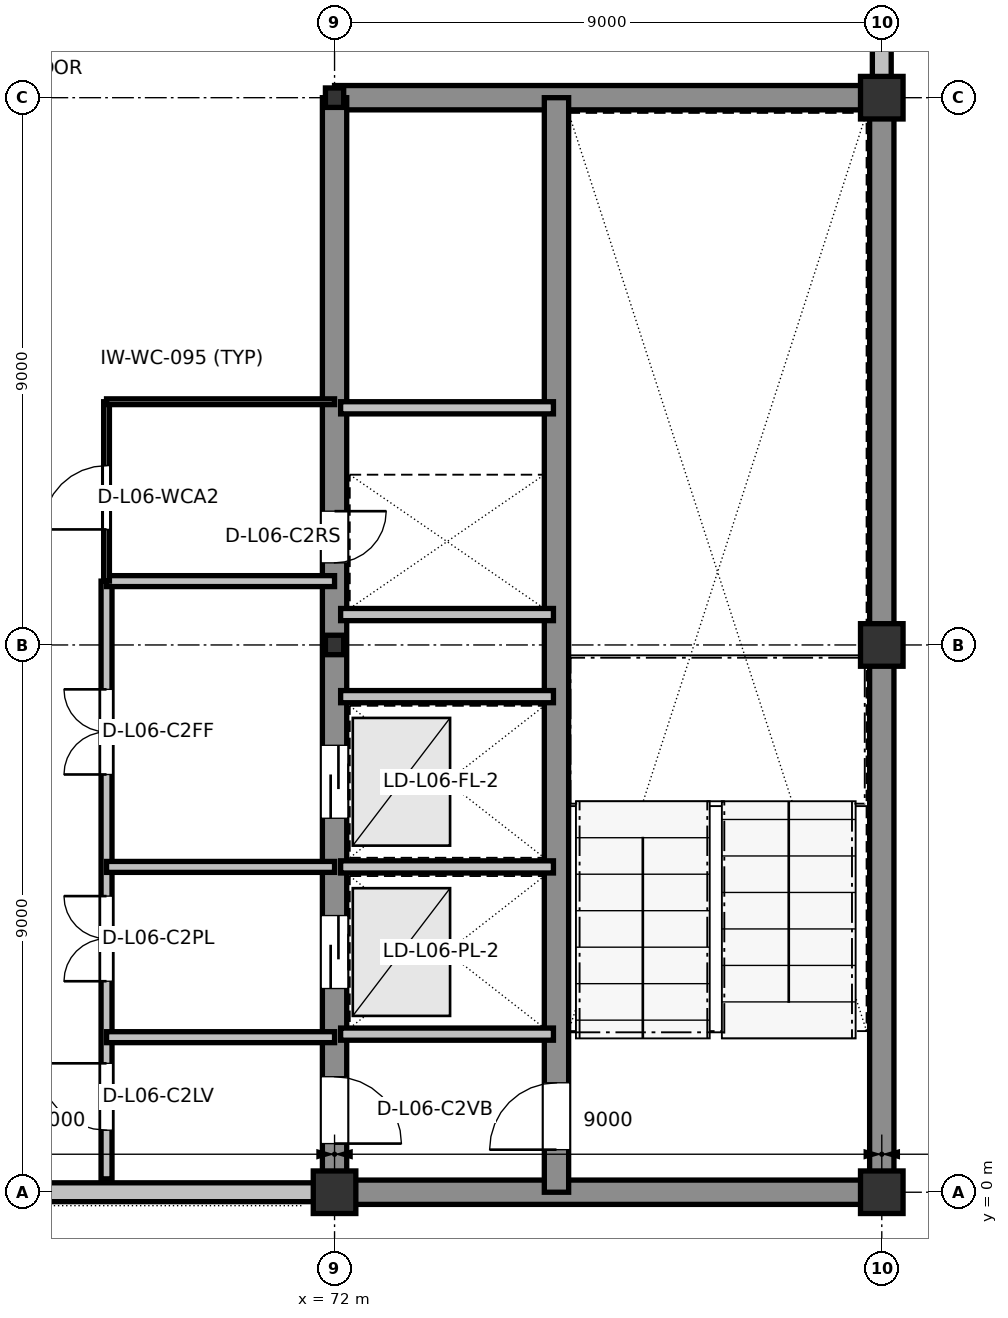
"""IFC4 building model, lengths in metres.
Left out: names, types, materials, properties, quantities, classifications, styles, units other than length and angle.
Written with IfcOpenShell. Run it as: python <this file> out.ifc"""

import sys

from ifc_helpers import new_model, si_unit, direction, frame, frame_2d, origin, origin_2d, place, context, subcontext, project, spatial, rectangle, i_section, extrude, element, fill, save


model = new_model("IFC4")
c1 = context("Model", 3, precision=1e-05, world=origin(), true_north=direction((0.0, 1.0)))
c2 = subcontext(c1, "Body", "Model", "MODEL_VIEW")
j1 = project(units=[si_unit("LENGTHUNIT", "METRE"), si_unit("PLANEANGLEUNIT", "RADIAN")], contexts=[c1])
p1 = place(None, origin())
s1 = spatial("IfcSite", under=j1, at=p1, CompositionType="ELEMENT")
p2 = place(p1, origin())
s2 = spatial("IfcBuilding", under=s1, at=p2, CompositionType="ELEMENT")
p3 = place(p2, frame((0.0, 0.0, 27.6)))
s3 = spatial("IfcBuildingStorey", under=s2, at=p3, CompositionType="ELEMENT", Elevation=27.6)
p4 = place(p3, frame((72.0, 0.0, 0.0), z_axis=(0.0, 0.0, 1.0), x_axis=(1.0, 0.0, 0.0)))
e1 = element("IfcColumn", 1, at=p4, inside=s3, PredefinedType="COLUMN", context=c2, shape_type="SweptSolid", body=[
    extrude(rectangle(XDim=0.7, YDim=0.7, at=origin_2d()), origin(), (0.0, 0.0, 1.0), 4.2),
])
for number, where, z_axis, x_axis in (
    (2, (72.0, 9.0, 0.0), (0.0, 0.0, 1.0), (1.0, 0.0, 0.0)),
    (3, (72.0, 18.0, 0.0), (0.0, 0.0, 1.0), (1.0, 0.0, 0.0)),
):
    element("IfcColumn", number, at=place(p3, frame(where, z_axis=z_axis, x_axis=x_axis)), inside=s3, PredefinedType="COLUMN", context=c2, shape_type="SweptSolid", body=[
        extrude(i_section(OverallWidth=0.3, OverallDepth=0.32, WebThickness=0.011, FlangeThickness=0.021, at=origin_2d()), origin(), (0.0, 0.0, 1.0), 4.2),
    ])
for number, where, z_axis, x_axis in (
    (4, (81.0, 0.0, 0.0), (0.0, 0.0, 1.0), (1.0, 0.0, 0.0)),
    (5, (81.0, 9.0, 0.0), (0.0, 0.0, 1.0), (1.0, 0.0, 0.0)),
    (6, (81.0, 18.0, 0.0), (0.0, 0.0, 1.0), (1.0, 0.0, 0.0)),
):
    element("IfcColumn", number, at=place(p3, frame(where, z_axis=z_axis, x_axis=x_axis)), inside=s3, PredefinedType="COLUMN", context=c2, shape_type="SweptSolid", body=[
        extrude(rectangle(XDim=0.7, YDim=0.7, at=origin_2d()), origin(), (0.0, 0.0, 1.0), 4.2),
    ])
p5 = place(p3, frame((63.335, 0.0, 0.0), z_axis=(0.0, 0.0, 1.0), x_axis=(1.0, 0.0, 0.0)))
e7 = element("IfcWall", 7, at=p5, inside=s3, PredefinedType="STANDARD", context=c2, shape_type="SweptSolid", body=[
    extrude(rectangle(XDim=8.33, YDim=0.31, at=frame_2d((4.165, 0.0))), origin(), (0.0, 0.0, 1.0), 3.715),
])
p6 = place(p5, frame((0.75, 0.0, 0.9)))
e8 = element("IfcOpeningElement", 8, at=p6, cuts=e7, PredefinedType="OPENING", context=c2, shape_type="SweptSolid", body=[
    extrude(rectangle(XDim=1.0, YDim=1.35, at=frame_2d((0.5, 0.675))), frame((0.0, 0.165, 0.0), z_axis=(0.0, -1.0, 0.0), x_axis=(1.0, 0.0, 0.0)), (0.0, 0.0, 1.0), 0.33),
])
p7 = place(p3, frame((81.0, 18.335, 0.0), z_axis=(0.0, 0.0, 1.0), x_axis=(0.0, 1.0, 0.0)))
e9 = element("IfcWall", 9, at=p7, inside=s3, PredefinedType="STANDARD", context=c2, shape_type="SweptSolid", body=[
    extrude(rectangle(XDim=2.74, YDim=0.31, at=frame_2d((1.37, 0.0))), origin(), (0.0, 0.0, 1.0), 3.94),
])
p8 = place(p3, frame((72.0, 0.0, 0.0), z_axis=(0.0, 0.0, 1.0), x_axis=(1.0, 0.0, 0.0)))
e10 = element("IfcWall", 10, at=p8, inside=s3, PredefinedType="SHEAR", context=c2, shape_type="SweptSolid", body=[
    extrude(rectangle(XDim=9.0, YDim=0.4, at=frame_2d((4.5, 0.0))), origin(), (0.0, 0.0, 1.0), 3.96),
])
p9 = place(p3, frame((81.0, 0.0, 0.0), z_axis=(0.0, 0.0, 1.0), x_axis=(0.0, 1.0, 0.0)))
e11 = element("IfcWall", 11, at=p9, inside=s3, PredefinedType="SHEAR", context=c2, shape_type="SweptSolid", body=[
    extrude(rectangle(XDim=18.0, YDim=0.4, at=frame_2d((9.0, 0.0))), origin(), (0.0, 0.0, 1.0), 3.96),
])
p10 = place(p3, frame((81.0, 18.0, 0.0), z_axis=(0.0, 0.0, 1.0), x_axis=(-1.0, 0.0, 0.0)))
e12 = element("IfcWall", 12, at=p10, inside=s3, PredefinedType="SHEAR", context=c2, shape_type="SweptSolid", body=[
    extrude(rectangle(XDim=9.0, YDim=0.4, at=frame_2d((4.5, 0.0))), origin(), (0.0, 0.0, 1.0), 3.96),
])
p11 = place(p3, frame((72.0, 18.0, 0.0), z_axis=(0.0, 0.0, 1.0), x_axis=(0.0, -1.0, 0.0)))
e13 = element("IfcWall", 13, at=p11, inside=s3, PredefinedType="SHEAR", context=c2, shape_type="SweptSolid", body=[
    extrude(rectangle(XDim=18.0, YDim=0.4, at=frame_2d((9.0, 0.0))), origin(), (0.0, 0.0, 1.0), 3.96),
])
p12 = place(p11, frame((16.1, 0.0, 0.0)))
e14 = element("IfcOpeningElement", 14, at=p12, cuts=e13, PredefinedType="OPENING", context=c2, shape_type="SweptSolid", body=[
    extrude(rectangle(XDim=1.1, YDim=2.16, at=frame_2d((0.55, 1.08))), frame((0.0, 0.21, 0.0), z_axis=(0.0, -1.0, 0.0), x_axis=(1.0, 0.0, 0.0)), (0.0, 0.0, 1.0), 0.42),
])
p13 = place(p11, frame((13.45, 0.0, 0.0)))
e15 = element("IfcOpeningElement", 15, at=p13, cuts=e13, PredefinedType="OPENING", context=c2, shape_type="SweptSolid", body=[
    extrude(rectangle(XDim=1.2, YDim=2.2, at=frame_2d((0.6, 1.1))), frame((0.0, 0.21, 0.0), z_axis=(0.0, -1.0, 0.0), x_axis=(1.0, 0.0, 0.0)), (0.0, 0.0, 1.0), 0.42),
])
p14 = place(p11, frame((10.65, 0.0, 0.0)))
e16 = element("IfcOpeningElement", 16, at=p14, cuts=e13, PredefinedType="OPENING", context=c2, shape_type="SweptSolid", body=[
    extrude(rectangle(XDim=1.2, YDim=2.2, at=frame_2d((0.6, 1.1))), frame((0.0, 0.21, 0.0), z_axis=(0.0, -1.0, 0.0), x_axis=(1.0, 0.0, 0.0)), (0.0, 0.0, 1.0), 0.42),
])
p15 = place(p11, frame((6.8, 0.0, 0.0)))
e17 = element("IfcOpeningElement", 17, at=p15, cuts=e13, PredefinedType="OPENING", context=c2, shape_type="SweptSolid", body=[
    extrude(rectangle(XDim=0.85, YDim=2.1, at=frame_2d((0.425, 1.05))), frame((0.0, 0.21, 0.0), z_axis=(0.0, -1.0, 0.0), x_axis=(1.0, 0.0, 0.0)), (0.0, 0.0, 1.0), 0.42),
])
p16 = place(p3, frame((75.65, 0.0, 0.0), z_axis=(0.0, 0.0, 1.0), x_axis=(0.0, 1.0, 0.0)))
e18 = element("IfcWall", 18, at=p16, inside=s3, PredefinedType="SHEAR", context=c2, shape_type="SweptSolid", body=[
    extrude(rectangle(XDim=18.0, YDim=0.4, at=frame_2d((9.0, 0.0))), origin(), (0.0, 0.0, 1.0), 3.96),
])
p17 = place(p16, frame((0.7, 0.0, 0.0)))
e19 = element("IfcOpeningElement", 19, at=p17, cuts=e18, PredefinedType="OPENING", context=c2, shape_type="SweptSolid", body=[
    extrude(rectangle(XDim=1.1, YDim=2.16, at=frame_2d((0.55, 1.08))), frame((0.0, 0.21, 0.0), z_axis=(0.0, -1.0, 0.0), x_axis=(1.0, 0.0, 0.0)), (0.0, 0.0, 1.0), 0.42),
])
for number, where, z_axis, x_axis in (
    (20, (72.1, 2.6, 0.0), (0.0, 0.0, 1.0), (1.0, 0.0, 0.0)),
    (21, (72.1, 5.35, 0.0), (0.0, 0.0, 1.0), (1.0, 0.0, 0.0)),
    (22, (72.1, 8.15, 0.0), (0.0, 0.0, 1.0), (1.0, 0.0, 0.0)),
    (23, (72.1, 9.5, 0.0), (0.0, 0.0, 1.0), (1.0, 0.0, 0.0)),
    (24, (72.1, 12.9, 0.0), (0.0, 0.0, 1.0), (1.0, 0.0, 0.0)),
):
    element("IfcWall", number, at=place(p3, frame(where, z_axis=z_axis, x_axis=x_axis)), inside=s3, PredefinedType="PARTITIONING", context=c2, shape_type="SweptSolid", body=[
        extrude(rectangle(XDim=3.5, YDim=0.2, at=frame_2d((1.75, 0.0))), origin(), (0.0, 0.0, 1.0), 3.96),
    ])
p18 = place(p3, frame((68.25, 0.22, 0.0), z_axis=(0.0, 0.0, 1.0), x_axis=(0.0, 1.0, 0.0)))
e25 = element("IfcWall", 25, at=p18, inside=s3, PredefinedType="PARTITIONING", context=c2, shape_type="SweptSolid", body=[
    extrude(rectangle(XDim=9.83, YDim=0.18, at=frame_2d((4.915, 0.0))), origin(), (0.0, 0.0, 1.0), 3.96),
])
p19 = place(p18, frame((0.8, 0.0, 0.0)))
e26 = element("IfcOpeningElement", 26, at=p19, cuts=e25, PredefinedType="OPENING", context=c2, shape_type="SweptSolid", body=[
    extrude(rectangle(XDim=1.1, YDim=2.16, at=frame_2d((0.55, 1.08))), frame((0.0, 0.1, 0.0), z_axis=(0.0, -1.0, 0.0), x_axis=(1.0, 0.0, 0.0)), (0.0, 0.0, 1.0), 0.2),
])
p20 = place(p18, frame((3.25, 0.0, 0.0)))
e27 = element("IfcOpeningElement", 27, at=p20, cuts=e25, PredefinedType="OPENING", context=c2, shape_type="SweptSolid", body=[
    extrude(rectangle(XDim=1.4, YDim=2.2, at=frame_2d((0.7, 1.1))), frame((0.0, 0.1, 0.0), z_axis=(0.0, -1.0, 0.0), x_axis=(1.0, 0.0, 0.0)), (0.0, 0.0, 1.0), 0.2),
])
p21 = place(p18, frame((6.65, 0.0, 0.0)))
e28 = element("IfcOpeningElement", 28, at=p21, cuts=e25, PredefinedType="OPENING", context=c2, shape_type="SweptSolid", body=[
    extrude(rectangle(XDim=1.4, YDim=2.2, at=frame_2d((0.7, 1.1))), frame((0.0, 0.1, 0.0), z_axis=(0.0, -1.0, 0.0), x_axis=(1.0, 0.0, 0.0)), (0.0, 0.0, 1.0), 0.2),
])
for number, where, z_axis, x_axis in (
    (29, (68.25, 2.55, 0.0), (0.0, 0.0, 1.0), (1.0, 0.0, 0.0)),
    (30, (68.25, 5.35, 0.0), (0.0, 0.0, 1.0), (1.0, 0.0, 0.0)),
    (31, (68.25, 10.05, 0.0), (0.0, 0.0, 1.0), (1.0, 0.0, 0.0)),
):
    element("IfcWall", number, at=place(p3, frame(where, z_axis=z_axis, x_axis=x_axis)), inside=s3, PredefinedType="PARTITIONING", context=c2, shape_type="SweptSolid", body=[
        extrude(rectangle(XDim=3.75, YDim=0.18, at=frame_2d((1.875, 0.0))), origin(), (0.0, 0.0, 1.0), 3.96),
    ])
p22 = place(p3, frame((68.25, 10.05, 0.0), z_axis=(0.0, 0.0, 1.0), x_axis=(0.0, 1.0, 0.0)))
e32 = element("IfcWall", 32, at=p22, inside=s3, PredefinedType="PARTITIONING", context=c2, shape_type="SweptSolid", body=[
    extrude(rectangle(XDim=2.95, YDim=0.095, at=frame_2d((1.475, 0.0))), origin(), (0.0, 0.0, 1.0), 3.96),
])
p23 = place(p22, frame((0.85, 0.0, 0.0)))
e33 = element("IfcOpeningElement", 33, at=p23, cuts=e32, PredefinedType="OPENING", context=c2, shape_type="SweptSolid", body=[
    extrude(rectangle(XDim=1.05, YDim=2.13, at=frame_2d((0.525, 1.065))), frame((0.0, 0.057, 0.0), z_axis=(0.0, -1.0, 0.0), x_axis=(1.0, 0.0, 0.0)), (0.0, 0.0, 1.0), 0.115),
])
p24 = place(p3, frame((68.25, 13.0, 0.0), z_axis=(0.0, 0.0, 1.0), x_axis=(1.0, 0.0, 0.0)))
e34 = element("IfcWall", 34, at=p24, inside=s3, PredefinedType="PARTITIONING", context=c2, shape_type="SweptSolid", body=[
    extrude(rectangle(XDim=3.75, YDim=0.095, at=frame_2d((1.875, 0.0))), origin(), (0.0, 0.0, 1.0), 3.96),
])
p25 = place(p17, origin())
e35 = element("IfcDoor", 35, at=p25, inside=s3, OperationType="SINGLE_SWING_LEFT", PredefinedType="DOOR", context=c2, shape_type="SweptSolid", body=[
    extrude(rectangle(XDim=1.1, YDim=2.16, at=frame_2d((0.55, 1.08))), frame((0.0, 0.025, 0.0), z_axis=(0.0, -1.0, 0.0), x_axis=(1.0, 0.0, 0.0)), (0.0, 0.0, 1.0), 0.05),
])
fill(e19, e35)
p26 = place(p12, origin())
e36 = element("IfcDoor", 36, at=p26, inside=s3, OperationType="SINGLE_SWING_RIGHT", PredefinedType="DOOR", context=c2, shape_type="SweptSolid", body=[
    extrude(rectangle(XDim=1.1, YDim=2.16, at=frame_2d((0.55, 1.08))), frame((0.0, 0.025, 0.0), z_axis=(0.0, -1.0, 0.0), x_axis=(1.0, 0.0, 0.0)), (0.0, 0.0, 1.0), 0.05),
])
fill(e14, e36)
p27 = place(p13, origin())
e37 = element("IfcDoor", 37, at=p27, inside=s3, OperationType="SLIDING_TO_LEFT", PredefinedType="DOOR", context=c2, shape_type="SweptSolid", body=[
    extrude(rectangle(XDim=1.2, YDim=2.2, at=frame_2d((0.6, 1.1))), frame((0.0, 0.025, 0.0), z_axis=(0.0, -1.0, 0.0), x_axis=(1.0, 0.0, 0.0)), (0.0, 0.0, 1.0), 0.05),
])
fill(e15, e37)
p28 = place(p14, origin())
e38 = element("IfcDoor", 38, at=p28, inside=s3, OperationType="SLIDING_TO_LEFT", PredefinedType="DOOR", context=c2, shape_type="SweptSolid", body=[
    extrude(rectangle(XDim=1.2, YDim=2.2, at=frame_2d((0.6, 1.1))), frame((0.0, 0.025, 0.0), z_axis=(0.0, -1.0, 0.0), x_axis=(1.0, 0.0, 0.0)), (0.0, 0.0, 1.0), 0.05),
])
fill(e16, e38)
p29 = place(p15, origin())
e39 = element("IfcDoor", 39, at=p29, inside=s3, OperationType="SINGLE_SWING_LEFT", PredefinedType="DOOR", context=c2, shape_type="SweptSolid", body=[
    extrude(rectangle(XDim=0.85, YDim=2.1, at=frame_2d((0.425, 1.05))), frame((0.0, 0.025, 0.0), z_axis=(0.0, -1.0, 0.0), x_axis=(1.0, 0.0, 0.0)), (0.0, 0.0, 1.0), 0.05),
])
fill(e17, e39)
p30 = place(p19, origin())
e40 = element("IfcDoor", 40, at=p30, inside=s3, OperationType="SINGLE_SWING_RIGHT", PredefinedType="DOOR", context=c2, shape_type="SweptSolid", body=[
    extrude(rectangle(XDim=1.1, YDim=2.16, at=frame_2d((0.55, 1.08))), frame((0.0, 0.025, 0.0), z_axis=(0.0, -1.0, 0.0), x_axis=(1.0, 0.0, 0.0)), (0.0, 0.0, 1.0), 0.05),
])
fill(e26, e40)
p31 = place(p20, origin())
e41 = element("IfcDoor", 41, at=p31, inside=s3, OperationType="DOUBLE_DOOR_SINGLE_SWING", PredefinedType="DOOR", context=c2, shape_type="SweptSolid", body=[
    extrude(rectangle(XDim=1.4, YDim=2.2, at=frame_2d((0.7, 1.1))), frame((0.0, 0.025, 0.0), z_axis=(0.0, -1.0, 0.0), x_axis=(1.0, 0.0, 0.0)), (0.0, 0.0, 1.0), 0.05),
])
fill(e27, e41)
p32 = place(p21, origin())
e42 = element("IfcDoor", 42, at=p32, inside=s3, OperationType="DOUBLE_DOOR_SINGLE_SWING", PredefinedType="DOOR", context=c2, shape_type="SweptSolid", body=[
    extrude(rectangle(XDim=1.4, YDim=2.2, at=frame_2d((0.7, 1.1))), frame((0.0, 0.025, 0.0), z_axis=(0.0, -1.0, 0.0), x_axis=(1.0, 0.0, 0.0)), (0.0, 0.0, 1.0), 0.05),
])
fill(e28, e42)
p33 = place(p23, origin())
e43 = element("IfcDoor", 43, at=p33, inside=s3, OperationType="SINGLE_SWING_LEFT", PredefinedType="DOOR", context=c2, shape_type="SweptSolid", body=[
    extrude(rectangle(XDim=1.05, YDim=2.13, at=frame_2d((0.525, 1.065))), frame((0.0, 0.025, 0.0), z_axis=(0.0, -1.0, 0.0), x_axis=(1.0, 0.0, 0.0)), (0.0, 0.0, 1.0), 0.05),
])
fill(e33, e43)
save(model, sys.argv[1])
